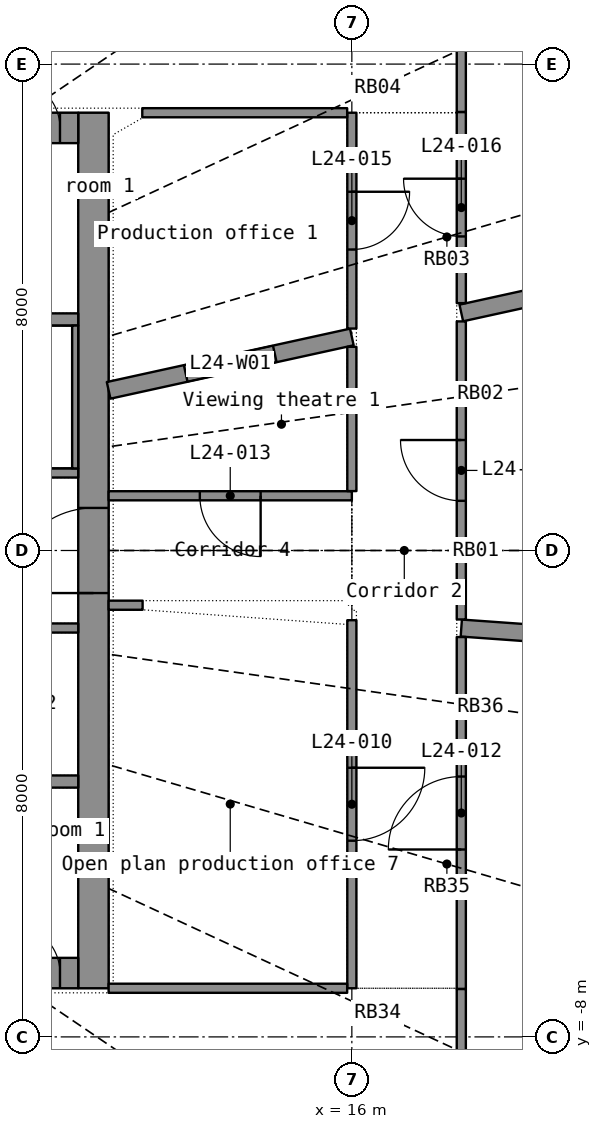
"""IFC4 building model, lengths in metres.
Left out: names, types, materials, properties, quantities, classifications, styles, units other than length and angle.
Written with IfcOpenShell. Run it as: python <this file> out.ifc"""

import sys

from ifc_helpers import new_model, si_unit, direction, frame, frame_2d, origin, place, context, subcontext, project, spatial, rectangle, extrude, element, fill, save


model = new_model("IFC4")
c1 = context("Model", 3, precision=1e-05, world=origin(), true_north=direction((0.0, 1.0)))
c2 = subcontext(c1, "Body", "Model", "MODEL_VIEW")
j1 = project(units=[si_unit("LENGTHUNIT", "METRE"), si_unit("PLANEANGLEUNIT", "RADIAN")], contexts=[c1])
p1 = place(None, origin())
s1 = spatial("IfcSite", under=j1, at=p1, CompositionType="ELEMENT")
p2 = place(p1, origin())
s2 = spatial("IfcBuilding", under=s1, at=p2, CompositionType="ELEMENT")
p3 = place(p2, frame((0.0, 0.0, 104.5)))
s3 = spatial("IfcBuildingStorey", under=s2, at=p3, CompositionType="ELEMENT", Elevation=104.5)
p4 = place(p3, frame((11.75, -7.2, 0.0), z_axis=(0.0, 0.0, 1.0), x_axis=(0.0, 1.0, 0.0)))
e1 = element("IfcWall", 1, at=p4, inside=s3, PredefinedType="SHEAR", context=c2, shape_type="SweptSolid", body=[
    extrude(rectangle(XDim=14.4, YDim=0.5, at=frame_2d((7.2, 0.0))), origin(), (0.0, 0.0, 1.0), 3.3),
])
p5 = place(p4, frame((6.5, 0.0, 0.0)))
e2 = element("IfcOpeningElement", 2, at=p5, cuts=e1, PredefinedType="OPENING", context=c2, shape_type="SweptSolid", body=[
    extrude(rectangle(XDim=1.4, YDim=2.2, at=frame_2d((0.7, 1.1))), frame((0.0, 0.26, 0.0), z_axis=(0.0, -1.0, 0.0), x_axis=(1.0, 0.0, 0.0)), (0.0, 0.0, 1.0), 0.52),
])
p6 = place(p3, frame((-11.5, -6.95, 0.0), z_axis=(0.0, 0.0, 1.0), x_axis=(1.0, 0.0, 0.0)))
e3 = element("IfcWall", 3, at=p6, inside=s3, PredefinedType="SHEAR", context=c2, shape_type="SweptSolid", body=[
    extrude(rectangle(XDim=23.0, YDim=0.5, at=frame_2d((11.5, 0.0))), origin(), (0.0, 0.0, 1.0), 3.3),
])
p7 = place(p6, frame((1.95, 0.0, 0.0)))
e4 = element("IfcOpeningElement", 4, at=p7, cuts=e3, PredefinedType="OPENING", context=c2, shape_type="SweptSolid", body=[
    extrude(rectangle(XDim=1.1, YDim=2.2, at=frame_2d((0.55, 1.1))), frame((0.0, 0.26, 0.0), z_axis=(0.0, -1.0, 0.0), x_axis=(1.0, 0.0, 0.0)), (0.0, 0.0, 1.0), 0.52),
])
p8 = place(p6, frame((3.95, 0.0, 0.0)))
e5 = element("IfcOpeningElement", 5, at=p8, cuts=e3, PredefinedType="OPENING", context=c2, shape_type="SweptSolid", body=[
    extrude(rectangle(XDim=1.1, YDim=2.2, at=frame_2d((0.55, 1.1))), frame((0.0, 0.26, 0.0), z_axis=(0.0, -1.0, 0.0), x_axis=(1.0, 0.0, 0.0)), (0.0, 0.0, 1.0), 0.52),
])
p9 = place(p6, frame((5.95, 0.0, 0.0)))
e6 = element("IfcOpeningElement", 6, at=p9, cuts=e3, PredefinedType="OPENING", context=c2, shape_type="SweptSolid", body=[
    extrude(rectangle(XDim=1.1, YDim=2.2, at=frame_2d((0.55, 1.1))), frame((0.0, 0.26, 0.0), z_axis=(0.0, -1.0, 0.0), x_axis=(1.0, 0.0, 0.0)), (0.0, 0.0, 1.0), 0.52),
])
p10 = place(p6, frame((7.95, 0.0, 0.0)))
e7 = element("IfcOpeningElement", 7, at=p10, cuts=e3, PredefinedType="OPENING", context=c2, shape_type="SweptSolid", body=[
    extrude(rectangle(XDim=1.1, YDim=2.2, at=frame_2d((0.55, 1.1))), frame((0.0, 0.26, 0.0), z_axis=(0.0, -1.0, 0.0), x_axis=(1.0, 0.0, 0.0)), (0.0, 0.0, 1.0), 0.52),
])
p11 = place(p6, frame((9.95, 0.0, 0.0)))
e8 = element("IfcOpeningElement", 8, at=p11, cuts=e3, PredefinedType="OPENING", context=c2, shape_type="SweptSolid", body=[
    extrude(rectangle(XDim=1.1, YDim=2.2, at=frame_2d((0.55, 1.1))), frame((0.0, 0.26, 0.0), z_axis=(0.0, -1.0, 0.0), x_axis=(1.0, 0.0, 0.0)), (0.0, 0.0, 1.0), 0.52),
])
p12 = place(p6, frame((11.95, 0.0, 0.0)))
e9 = element("IfcOpeningElement", 9, at=p12, cuts=e3, PredefinedType="OPENING", context=c2, shape_type="SweptSolid", body=[
    extrude(rectangle(XDim=1.1, YDim=2.2, at=frame_2d((0.55, 1.1))), frame((0.0, 0.26, 0.0), z_axis=(0.0, -1.0, 0.0), x_axis=(1.0, 0.0, 0.0)), (0.0, 0.0, 1.0), 0.52),
])
p13 = place(p6, frame((13.95, 0.0, 0.0)))
e10 = element("IfcOpeningElement", 10, at=p13, cuts=e3, PredefinedType="OPENING", context=c2, shape_type="SweptSolid", body=[
    extrude(rectangle(XDim=1.1, YDim=2.2, at=frame_2d((0.55, 1.1))), frame((0.0, 0.26, 0.0), z_axis=(0.0, -1.0, 0.0), x_axis=(1.0, 0.0, 0.0)), (0.0, 0.0, 1.0), 0.52),
])
p14 = place(p6, frame((15.95, 0.0, 0.0)))
e11 = element("IfcOpeningElement", 11, at=p14, cuts=e3, PredefinedType="OPENING", context=c2, shape_type="SweptSolid", body=[
    extrude(rectangle(XDim=1.1, YDim=2.2, at=frame_2d((0.55, 1.1))), frame((0.0, 0.26, 0.0), z_axis=(0.0, -1.0, 0.0), x_axis=(1.0, 0.0, 0.0)), (0.0, 0.0, 1.0), 0.52),
])
p15 = place(p6, frame((19.95, 0.0, 0.0)))
e12 = element("IfcOpeningElement", 12, at=p15, cuts=e3, PredefinedType="OPENING", context=c2, shape_type="SweptSolid", body=[
    extrude(rectangle(XDim=1.1, YDim=2.2, at=frame_2d((0.55, 1.1))), frame((0.0, 0.26, 0.0), z_axis=(0.0, -1.0, 0.0), x_axis=(1.0, 0.0, 0.0)), (0.0, 0.0, 1.0), 0.52),
])
p16 = place(p6, frame((0.3, 0.0, 0.0)))
e13 = element("IfcOpeningElement", 13, at=p16, cuts=e3, PredefinedType="OPENING", context=c2, shape_type="SweptSolid", body=[
    extrude(rectangle(XDim=0.8, YDim=2.05, at=frame_2d((0.4, 1.025))), frame((0.0, 0.26, 0.0), z_axis=(0.0, -1.0, 0.0), x_axis=(1.0, 0.0, 0.0)), (0.0, 0.0, 1.0), 0.52),
])
p17 = place(p6, frame((21.9, 0.0, 0.0)))
e14 = element("IfcOpeningElement", 14, at=p17, cuts=e3, PredefinedType="OPENING", context=c2, shape_type="SweptSolid", body=[
    extrude(rectangle(XDim=0.8, YDim=2.05, at=frame_2d((0.4, 1.025))), frame((0.0, 0.26, 0.0), z_axis=(0.0, -1.0, 0.0), x_axis=(1.0, 0.0, 0.0)), (0.0, 0.0, 1.0), 0.52),
])
p18 = place(p3, frame((-11.5, 6.95, 0.0), z_axis=(0.0, 0.0, 1.0), x_axis=(1.0, 0.0, 0.0)))
e15 = element("IfcWall", 15, at=p18, inside=s3, PredefinedType="SHEAR", context=c2, shape_type="SweptSolid", body=[
    extrude(rectangle(XDim=23.0, YDim=0.5, at=frame_2d((11.5, 0.0))), origin(), (0.0, 0.0, 1.0), 3.3),
])
p19 = place(p18, frame((1.95, 0.0, 0.0)))
e16 = element("IfcOpeningElement", 16, at=p19, cuts=e15, PredefinedType="OPENING", context=c2, shape_type="SweptSolid", body=[
    extrude(rectangle(XDim=1.1, YDim=2.2, at=frame_2d((0.55, 1.1))), frame((0.0, 0.26, 0.0), z_axis=(0.0, -1.0, 0.0), x_axis=(1.0, 0.0, 0.0)), (0.0, 0.0, 1.0), 0.52),
])
p20 = place(p18, frame((8.05, 0.0, 0.0)))
e17 = element("IfcOpeningElement", 17, at=p20, cuts=e15, PredefinedType="OPENING", context=c2, shape_type="SweptSolid", body=[
    extrude(rectangle(XDim=0.9, YDim=2.1, at=frame_2d((0.45, 1.05))), frame((0.0, 0.26, 0.0), z_axis=(0.0, -1.0, 0.0), x_axis=(1.0, 0.0, 0.0)), (0.0, 0.0, 1.0), 0.52),
])
p21 = place(p18, frame((16.05, 0.0, 0.0)))
e18 = element("IfcOpeningElement", 18, at=p21, cuts=e15, PredefinedType="OPENING", context=c2, shape_type="SweptSolid", body=[
    extrude(rectangle(XDim=0.9, YDim=2.1, at=frame_2d((0.45, 1.05))), frame((0.0, 0.26, 0.0), z_axis=(0.0, -1.0, 0.0), x_axis=(1.0, 0.0, 0.0)), (0.0, 0.0, 1.0), 0.52),
])
p22 = place(p18, frame((0.3, 0.0, 0.0)))
e19 = element("IfcOpeningElement", 19, at=p22, cuts=e15, PredefinedType="OPENING", context=c2, shape_type="SweptSolid", body=[
    extrude(rectangle(XDim=0.8, YDim=2.05, at=frame_2d((0.4, 1.025))), frame((0.0, 0.26, 0.0), z_axis=(0.0, -1.0, 0.0), x_axis=(1.0, 0.0, 0.0)), (0.0, 0.0, 1.0), 0.52),
])
p23 = place(p18, frame((21.9, 0.0, 0.0)))
e20 = element("IfcOpeningElement", 20, at=p23, cuts=e15, PredefinedType="OPENING", context=c2, shape_type="SweptSolid", body=[
    extrude(rectangle(XDim=0.8, YDim=2.05, at=frame_2d((0.4, 1.025))), frame((0.0, 0.26, 0.0), z_axis=(0.0, -1.0, 0.0), x_axis=(1.0, 0.0, 0.0)), (0.0, 0.0, 1.0), 0.52),
])
for number, where, z_axis, x_axis in (
    (21, (-11.5, -3.8, 0.0), (0.0, 0.0, 1.0), (1.0, 0.0, 0.0)),
    (22, (-11.5, 3.8, 0.0), (0.0, 0.0, 1.0), (1.0, 0.0, 0.0)),
):
    element("IfcWall", number, at=place(p3, frame(where, z_axis=z_axis, x_axis=x_axis)), inside=s3, PredefinedType="SHEAR", context=c2, shape_type="SweptSolid", body=[
        extrude(rectangle(XDim=23.0, YDim=0.2, at=frame_2d((11.5, 0.0))), origin(), (0.0, 0.0, 1.0), 3.3),
    ])
p24 = place(p3, frame((3.0, -1.275, 0.0), z_axis=(0.0, 0.0, 1.0), x_axis=(1.0, 0.0, 0.0)))
e23 = element("IfcWall", 23, at=p24, inside=s3, PredefinedType="PARTITIONING", context=c2, shape_type="SweptSolid", body=[
    extrude(rectangle(XDim=8.5, YDim=0.15, at=frame_2d((4.25, 0.0))), origin(), (0.0, 0.0, 1.0), 3.3),
])
p25 = place(p24, frame((0.805, 0.0, 0.0)))
e24 = element("IfcOpeningElement", 24, at=p25, cuts=e23, PredefinedType="OPENING", context=c2, shape_type="SweptSolid", body=[
    extrude(rectangle(XDim=0.85, YDim=2.1, at=frame_2d((0.425, 1.05))), frame((0.0, 0.085, 0.0), z_axis=(0.0, -1.0, 0.0), x_axis=(1.0, 0.0, 0.0)), (0.0, 0.0, 1.0), 0.17),
])
p26 = place(p24, frame((3.062, 0.0, 0.0)))
e25 = element("IfcOpeningElement", 25, at=p26, cuts=e23, PredefinedType="OPENING", context=c2, shape_type="SweptSolid", body=[
    extrude(rectangle(XDim=0.9, YDim=2.1, at=frame_2d((0.45, 1.05))), frame((0.0, 0.085, 0.0), z_axis=(0.0, -1.0, 0.0), x_axis=(1.0, 0.0, 0.0)), (0.0, 0.0, 1.0), 0.17),
])
p27 = place(p24, frame((6.082, 0.0, 0.0)))
e26 = element("IfcOpeningElement", 26, at=p27, cuts=e23, PredefinedType="OPENING", context=c2, shape_type="SweptSolid", body=[
    extrude(rectangle(XDim=0.9, YDim=2.1, at=frame_2d((0.45, 1.05))), frame((0.0, 0.085, 0.0), z_axis=(0.0, -1.0, 0.0), x_axis=(1.0, 0.0, 0.0)), (0.0, 0.0, 1.0), 0.17),
])
p28 = place(p3, frame((3.0, 1.275, 0.0), z_axis=(0.0, 0.0, 1.0), x_axis=(1.0, 0.0, 0.0)))
e27 = element("IfcWall", 27, at=p28, inside=s3, PredefinedType="SHEAR", context=c2, shape_type="SweptSolid", body=[
    extrude(rectangle(XDim=8.5, YDim=0.15, at=frame_2d((4.25, 0.0))), origin(), (0.0, 0.0, 1.0), 3.3),
])
p29 = place(p28, frame((2.05, 0.0, 0.0)))
e28 = element("IfcOpeningElement", 28, at=p29, cuts=e27, PredefinedType="OPENING", context=c2, shape_type="SweptSolid", body=[
    extrude(rectangle(XDim=1.1, YDim=2.15, at=frame_2d((0.55, 1.075))), frame((0.0, 0.085, 0.0), z_axis=(0.0, -1.0, 0.0), x_axis=(1.0, 0.0, 0.0)), (0.0, 0.0, 1.0), 0.17),
])
p30 = place(p28, frame((0.45, 0.0, 0.0)))
e29 = element("IfcOpeningElement", 29, at=p30, cuts=e27, PredefinedType="OPENING", context=c2, shape_type="SweptSolid", body=[
    extrude(rectangle(XDim=0.9, YDim=2.1, at=frame_2d((0.45, 1.05))), frame((0.0, 0.085, 0.0), z_axis=(0.0, -1.0, 0.0), x_axis=(1.0, 0.0, 0.0)), (0.0, 0.0, 1.0), 0.17),
])
p31 = place(p3, frame((11.45, 1.35, 0.0), z_axis=(0.0, 0.0, 1.0), x_axis=(0.0, 1.0, 0.0)))
e30 = element("IfcWall", 30, at=p31, inside=s3, PredefinedType="SHEAR", context=c2, shape_type="SweptSolid", body=[
    extrude(rectangle(XDim=2.35, YDim=0.1, at=frame_2d((1.175, 0.0))), origin(), (0.0, 0.0, 1.0), 3.3),
])
p32 = place(p3, frame((25.771, -1.847, 0.0), z_axis=(0.0, 0.0, 1.0), x_axis=(-0.997443635, 0.071457645, 0.0)))
e31 = element("IfcWall", 31, at=p32, inside=s3, PredefinedType="PARTITIONING", context=c2, shape_type="SweptSolid", body=[
    extrude(rectangle(XDim=7.991, YDim=0.28, at=frame_2d((3.996, 0.0))), origin(), (0.0, 0.0, 1.0), 2.4),
])
p33 = place(p32, frame((3.246, 0.0, 1.0)))
e32 = element("IfcOpeningElement", 32, at=p33, cuts=e31, PredefinedType="OPENING", context=c2, shape_type="SweptSolid", body=[
    extrude(rectangle(XDim=1.5, YDim=1.2, at=frame_2d((0.75, 0.6))), frame((0.0, 0.15, 0.0), z_axis=(0.0, -1.0, 0.0), x_axis=(1.0, 0.0, 0.0)), (0.0, 0.0, 1.0), 0.3),
])
p34 = place(p3, frame((24.986, 5.484, 0.0), z_axis=(0.0, 0.0, 1.0), x_axis=(-0.976749089, -0.214385673, 0.0)))
e33 = element("IfcWall", 33, at=p34, inside=s3, PredefinedType="PARTITIONING", context=c2, shape_type="SweptSolid", body=[
    extrude(rectangle(XDim=7.357, YDim=0.28, at=frame_2d((3.678, 0.0))), origin(), (0.0, 0.0, 1.0), 2.4),
])
p35 = place(p3, frame((16.0, -1.146, 0.0), z_axis=(0.0, 0.0, 1.0), x_axis=(0.0, -1.0, 0.0)))
e34 = element("IfcWall", 34, at=p35, inside=s3, PredefinedType="PARTITIONING", context=c2, shape_type="SweptSolid", body=[
    extrude(rectangle(XDim=6.053, YDim=0.15, at=frame_2d((3.027, 0.0))), origin(), (0.0, 0.0, 1.0), 2.4),
])
p36 = place(p35, frame((2.427, 0.0, 0.0)))
e35 = element("IfcOpeningElement", 35, at=p36, cuts=e34, PredefinedType="OPENING", context=c2, shape_type="SweptSolid", body=[
    extrude(rectangle(XDim=1.2, YDim=2.2, at=frame_2d((0.6, 1.1))), frame((0.0, 0.085, 0.0), z_axis=(0.0, -1.0, 0.0), x_axis=(1.0, 0.0, 0.0)), (0.0, 0.0, 1.0), 0.17),
])
p37 = place(p3, frame((17.8, -7.212, 0.0), z_axis=(0.0, 0.0, 1.0), x_axis=(0.0, 1.0, 0.0)))
e36 = element("IfcWall", 36, at=p37, inside=s3, PredefinedType="PARTITIONING", context=c2, shape_type="SweptSolid", body=[
    extrude(rectangle(XDim=5.789, YDim=0.15, at=frame_2d((2.894, 0.0))), origin(), (0.0, 0.0, 1.0), 2.4),
])
p38 = place(p37, frame((2.294, 0.0, 0.0)))
e37 = element("IfcOpeningElement", 37, at=p38, cuts=e36, PredefinedType="OPENING", context=c2, shape_type="SweptSolid", body=[
    extrude(rectangle(XDim=1.2, YDim=2.2, at=frame_2d((0.6, 1.1))), frame((0.0, 0.085, 0.0), z_axis=(0.0, -1.0, 0.0), x_axis=(1.0, 0.0, 0.0)), (0.0, 0.0, 1.0), 0.17),
])
p39 = place(p3, frame((17.8, -1.134, 0.0), z_axis=(0.0, 0.0, 1.0), x_axis=(0.0, 1.0, 0.0)))
e38 = element("IfcWall", 38, at=p39, inside=s3, PredefinedType="PARTITIONING", context=c2, shape_type="SweptSolid", body=[
    extrude(rectangle(XDim=4.902, YDim=0.15, at=frame_2d((2.451, 0.0))), origin(), (0.0, 0.0, 1.0), 2.4),
])
p40 = place(p39, frame((1.951, 0.0, 0.0)))
e39 = element("IfcOpeningElement", 39, at=p40, cuts=e38, PredefinedType="OPENING", context=c2, shape_type="SweptSolid", body=[
    extrude(rectangle(XDim=1.0, YDim=2.2, at=frame_2d((0.5, 1.1))), frame((0.0, 0.085, 0.0), z_axis=(0.0, -1.0, 0.0), x_axis=(1.0, 0.0, 0.0)), (0.0, 0.0, 1.0), 0.17),
])
p41 = place(p3, frame((16.0, 3.512, 0.0), z_axis=(0.0, 0.0, 1.0), x_axis=(-0.976750433, -0.214379551, 0.0)))
e40 = element("IfcWall", 40, at=p41, inside=s3, PredefinedType="PARTITIONING", context=c2, shape_type="SweptSolid", body=[
    extrude(rectangle(XDim=4.095, YDim=0.28, at=frame_2d((2.048, 0.0))), origin(), (0.0, 0.0, 1.0), 2.4),
])
p42 = place(p41, frame((1.298, 0.0, 1.0)))
e41 = element("IfcOpeningElement", 41, at=p42, cuts=e40, PredefinedType="OPENING", context=c2, shape_type="SweptSolid", body=[
    extrude(rectangle(XDim=1.5, YDim=1.2, at=frame_2d((0.75, 0.6))), frame((0.0, 0.15, 0.0), z_axis=(0.0, -1.0, 0.0), x_axis=(1.0, 0.0, 0.0)), (0.0, 0.0, 1.0), 0.3),
])
p43 = place(p3, frame((15.923, -7.2, 0.0), z_axis=(0.0, 0.0, 1.0), x_axis=(-1.0, 0.0, 0.0)))
e42 = element("IfcWall", 42, at=p43, inside=s3, PredefinedType="PARTITIONING", context=c2, shape_type="SweptSolid", body=[
    extrude(rectangle(XDim=3.923, YDim=0.15, at=frame_2d((1.961, 0.0))), origin(), (0.0, 0.0, 1.0), 2.4),
])
p44 = place(p3, frame((16.0, 0.9, 0.0), z_axis=(0.0, 0.0, 1.0), x_axis=(-1.0, 0.0, 0.0)))
e43 = element("IfcWall", 43, at=p44, inside=s3, PredefinedType="PARTITIONING", context=c2, shape_type="SweptSolid", body=[
    extrude(rectangle(XDim=4.0, YDim=0.15, at=frame_2d((2.0, 0.0))), origin(), (0.0, 0.0, 1.0), 2.4),
])
p45 = place(p44, frame((1.5, 0.0, 0.0)))
e44 = element("IfcOpeningElement", 44, at=p45, cuts=e43, PredefinedType="OPENING", context=c2, shape_type="SweptSolid", body=[
    extrude(rectangle(XDim=1.0, YDim=2.2, at=frame_2d((0.5, 1.1))), frame((0.0, 0.085, 0.0), z_axis=(0.0, -1.0, 0.0), x_axis=(1.0, 0.0, 0.0)), (0.0, 0.0, 1.0), 0.17),
])
p46 = place(p3, frame((16.0, 7.2, 0.0), z_axis=(0.0, 0.0, 1.0), x_axis=(0.0, -1.0, 0.0)))
e45 = element("IfcWall", 45, at=p46, inside=s3, PredefinedType="PARTITIONING", context=c2, shape_type="SweptSolid", body=[
    extrude(rectangle(XDim=3.55, YDim=0.15, at=frame_2d((1.775, 0.0))), origin(), (0.0, 0.0, 1.0), 2.4),
])
p47 = place(p46, frame((1.3, 0.0, 0.0)))
e46 = element("IfcOpeningElement", 46, at=p47, cuts=e45, PredefinedType="OPENING", context=c2, shape_type="SweptSolid", body=[
    extrude(rectangle(XDim=0.95, YDim=2.15, at=frame_2d((0.475, 1.075))), frame((0.0, 0.085, 0.0), z_axis=(0.0, -1.0, 0.0), x_axis=(1.0, 0.0, 0.0)), (0.0, 0.0, 1.0), 0.17),
])
p48 = place(p3, frame((12.553, 7.2, 0.0), z_axis=(0.0, 0.0, 1.0), x_axis=(1.0, 0.0, 0.0)))
e47 = element("IfcWall", 47, at=p48, inside=s3, PredefinedType="PARTITIONING", context=c2, shape_type="SweptSolid", body=[
    extrude(rectangle(XDim=3.37, YDim=0.15, at=frame_2d((1.685, 0.0))), origin(), (0.0, 0.0, 1.0), 2.4),
])
p49 = place(p3, frame((17.8, 4.069, 0.0), z_axis=(0.0, 0.0, 1.0), x_axis=(0.0, 1.0, 0.0)))
e48 = element("IfcWall", 48, at=p49, inside=s3, PredefinedType="PARTITIONING", context=c2, shape_type="SweptSolid", body=[
    extrude(rectangle(XDim=3.143, YDim=0.15, at=frame_2d((1.572, 0.0))), origin(), (0.0, 0.0, 1.0), 2.4),
])
p50 = place(p49, frame((1.097, 0.0, 0.0)))
e49 = element("IfcOpeningElement", 49, at=p50, cuts=e48, PredefinedType="OPENING", context=c2, shape_type="SweptSolid", body=[
    extrude(rectangle(XDim=0.95, YDim=2.15, at=frame_2d((0.475, 1.075))), frame((0.0, 0.085, 0.0), z_axis=(0.0, -1.0, 0.0), x_axis=(1.0, 0.0, 0.0)), (0.0, 0.0, 1.0), 0.17),
])
for number, where, z_axis, x_axis in (
    (50, (17.8, 7.213, 0.0), (0.0, 0.0, 1.0), (0.0, 1.0, 0.0)),
    (51, (17.8, -10.123, 0.0), (0.0, 0.0, 1.0), (0.0, 1.0, 0.0)),
):
    element("IfcWall", number, at=place(p3, frame(where, z_axis=z_axis, x_axis=x_axis)), inside=s3, PredefinedType="PARTITIONING", context=c2, shape_type="SweptSolid", body=[
        extrude(rectangle(XDim=2.91, YDim=0.15, at=frame_2d((1.455, 0.0))), origin(), (0.0, 0.0, 1.0), 2.4),
    ])
p51 = place(p3, frame((16.0, 3.35, 0.0), z_axis=(0.0, 0.0, 1.0), x_axis=(0.0, -1.0, 0.0)))
e52 = element("IfcWall", 52, at=p51, inside=s3, PredefinedType="PARTITIONING", context=c2, shape_type="SweptSolid", body=[
    extrude(rectangle(XDim=2.373, YDim=0.15, at=frame_2d((1.187, 0.0))), origin(), (0.0, 0.0, 1.0), 2.4),
])
p52 = place(p3, frame((12.0, -0.9, 0.0), z_axis=(0.0, 0.0, 1.0), x_axis=(1.0, 0.0, 0.0)))
e53 = element("IfcWall", 53, at=p52, inside=s3, PredefinedType="PARTITIONING", context=c2, shape_type="SweptSolid", body=[
    extrude(rectangle(XDim=0.559, YDim=0.15, at=frame_2d((0.279, 0.0))), origin(), (0.0, 0.0, 1.0), 2.4),
])
p53 = place(p17, origin())
e54 = element("IfcDoor", 54, at=p53, inside=s3, OperationType="SINGLE_SWING_LEFT", PredefinedType="DOOR", context=c2, shape_type="SweptSolid", body=[
    extrude(rectangle(XDim=0.8, YDim=2.05, at=frame_2d((0.4, 1.025))), frame((0.0, 0.025, 0.0), z_axis=(0.0, -1.0, 0.0), x_axis=(1.0, 0.0, 0.0)), (0.0, 0.0, 1.0), 0.05),
])
fill(e14, e54)
p54 = place(p23, origin())
e55 = element("IfcDoor", 55, at=p54, inside=s3, OperationType="SINGLE_SWING_LEFT", PredefinedType="DOOR", context=c2, shape_type="SweptSolid", body=[
    extrude(rectangle(XDim=0.8, YDim=2.05, at=frame_2d((0.4, 1.025))), frame((0.0, 0.025, 0.0), z_axis=(0.0, -1.0, 0.0), x_axis=(1.0, 0.0, 0.0)), (0.0, 0.0, 1.0), 0.05),
])
fill(e20, e55)
p55 = place(p5, origin())
e56 = element("IfcDoor", 56, at=p55, inside=s3, OperationType="DOUBLE_DOOR_SINGLE_SWING", PredefinedType="DOOR", context=c2, shape_type="SweptSolid", body=[
    extrude(rectangle(XDim=1.4, YDim=2.2, at=frame_2d((0.7, 1.1))), frame((0.0, 0.025, 0.0), z_axis=(0.0, -1.0, 0.0), x_axis=(1.0, 0.0, 0.0)), (0.0, 0.0, 1.0), 0.05),
])
fill(e2, e56)
p56 = place(p36, origin())
e57 = element("IfcDoor", 57, at=p56, inside=s3, OperationType="DOUBLE_DOOR_SINGLE_SWING", PredefinedType="DOOR", context=c2, shape_type="SweptSolid", body=[
    extrude(rectangle(XDim=1.2, YDim=2.2, at=frame_2d((0.6, 1.1))), frame((0.0, 0.025, 0.0), z_axis=(0.0, -1.0, 0.0), x_axis=(1.0, 0.0, 0.0)), (0.0, 0.0, 1.0), 0.05),
])
fill(e35, e57)
p57 = place(p38, origin())
e58 = element("IfcDoor", 58, at=p57, inside=s3, OperationType="DOUBLE_DOOR_SINGLE_SWING", PredefinedType="DOOR", context=c2, shape_type="SweptSolid", body=[
    extrude(rectangle(XDim=1.2, YDim=2.2, at=frame_2d((0.6, 1.1))), frame((0.0, 0.025, 0.0), z_axis=(0.0, -1.0, 0.0), x_axis=(1.0, 0.0, 0.0)), (0.0, 0.0, 1.0), 0.05),
])
fill(e37, e58)
p58 = place(p45, origin())
e59 = element("IfcDoor", 59, at=p58, inside=s3, OperationType="SINGLE_SWING_LEFT", PredefinedType="DOOR", context=c2, shape_type="SweptSolid", body=[
    extrude(rectangle(XDim=1.0, YDim=2.2, at=frame_2d((0.5, 1.1))), frame((0.0, 0.025, 0.0), z_axis=(0.0, -1.0, 0.0), x_axis=(1.0, 0.0, 0.0)), (0.0, 0.0, 1.0), 0.05),
])
fill(e44, e59)
p59 = place(p40, origin())
e60 = element("IfcDoor", 60, at=p59, inside=s3, OperationType="SINGLE_SWING_RIGHT", PredefinedType="DOOR", context=c2, shape_type="SweptSolid", body=[
    extrude(rectangle(XDim=1.0, YDim=2.2, at=frame_2d((0.5, 1.1))), frame((0.0, 0.025, 0.0), z_axis=(0.0, -1.0, 0.0), x_axis=(1.0, 0.0, 0.0)), (0.0, 0.0, 1.0), 0.05),
])
fill(e39, e60)
p60 = place(p47, origin())
e61 = element("IfcDoor", 61, at=p60, inside=s3, OperationType="SINGLE_SWING_LEFT", PredefinedType="DOOR", context=c2, shape_type="SweptSolid", body=[
    extrude(rectangle(XDim=0.95, YDim=2.15, at=frame_2d((0.475, 1.075))), frame((0.0, 0.025, 0.0), z_axis=(0.0, -1.0, 0.0), x_axis=(1.0, 0.0, 0.0)), (0.0, 0.0, 1.0), 0.05),
])
fill(e46, e61)
p61 = place(p50, origin())
e62 = element("IfcDoor", 62, at=p61, inside=s3, OperationType="SINGLE_SWING_RIGHT", PredefinedType="DOOR", context=c2, shape_type="SweptSolid", body=[
    extrude(rectangle(XDim=0.95, YDim=2.15, at=frame_2d((0.475, 1.075))), frame((0.0, 0.025, 0.0), z_axis=(0.0, -1.0, 0.0), x_axis=(1.0, 0.0, 0.0)), (0.0, 0.0, 1.0), 0.05),
])
fill(e49, e62)
p62 = place(p42, origin())
e63 = element("IfcWindow", 63, at=p62, inside=s3, PartitioningType="SINGLE_PANEL", PredefinedType="WINDOW", context=c2, shape_type="SweptSolid", body=[
    extrude(rectangle(XDim=1.5, YDim=1.2, at=frame_2d((0.75, 0.6))), frame((0.0, 0.03, 0.0), z_axis=(0.0, -1.0, 0.0), x_axis=(1.0, 0.0, 0.0)), (0.0, 0.0, 1.0), 0.06),
])
fill(e41, e63)
save(model, sys.argv[1])
